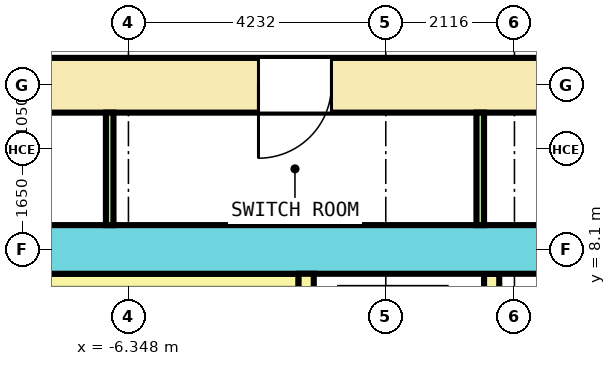
"""IFC4 building model, lengths in metres.
Left out: names, types, materials, properties, quantities, classifications, styles, units other than length and angle.
Written with IfcOpenShell. Run it as: python <this file> out.ifc"""

import sys

from ifc_helpers import new_model, si_unit, direction, frame, frame_2d, origin, place, context, subcontext, project, spatial, rectangle, extrude, element, fill, save


model = new_model("IFC4")
c1 = context("Model", 3, precision=1e-05, world=origin(), true_north=direction((0.0, 1.0)))
c2 = subcontext(c1, "Body", "Model", "MODEL_VIEW")
j1 = project(units=[si_unit("LENGTHUNIT", "METRE"), si_unit("PLANEANGLEUNIT", "RADIAN")], contexts=[c1])
p1 = place(None, origin())
s1 = spatial("IfcSite", under=j1, at=p1, CompositionType="ELEMENT")
p2 = place(p1, origin())
s2 = spatial("IfcBuilding", under=s1, at=p2, CompositionType="ELEMENT")
p3 = place(p2, frame((0.0, 0.0, -5.2)))
s3 = spatial("IfcBuildingStorey", under=s2, at=p3, CompositionType="ELEMENT", Elevation=-5.2)
p4 = place(p3, frame((-13.65, 10.8, 0.0), z_axis=(0.0, 0.0, 1.0), x_axis=(1.0, 0.0, 0.0)))
e1 = element("IfcWall", 1, at=p4, inside=s3, PredefinedType="SHEAR", context=c2, shape_type="SweptSolid", body=[
    extrude(rectangle(XDim=27.3, YDim=0.9, at=frame_2d((13.65, 0.0))), origin(), (0.0, 0.0, 1.0), 4.9),
])
p5 = place(p4, frame((3.316, 0.0, 0.0)))
e2 = element("IfcOpeningElement", 2, at=p5, cuts=e1, PredefinedType="OPENING", context=c2, shape_type="SweptSolid", body=[
    extrude(rectangle(XDim=1.2, YDim=2.1, at=frame_2d((0.6, 1.05))), frame((0.0, 0.46, 0.0), z_axis=(0.0, -1.0, 0.0), x_axis=(1.0, 0.0, 0.0)), (0.0, 0.0, 1.0), 0.92),
])
p6 = place(p4, frame((9.441, 0.0, 0.0)))
e3 = element("IfcOpeningElement", 3, at=p6, cuts=e1, PredefinedType="OPENING", context=c2, shape_type="SweptSolid", body=[
    extrude(rectangle(XDim=1.2, YDim=2.1, at=frame_2d((0.6, 1.05))), frame((0.0, 0.46, 0.0), z_axis=(0.0, -1.0, 0.0), x_axis=(1.0, 0.0, 0.0)), (0.0, 0.0, 1.0), 0.92),
])
p7 = place(p4, frame((18.76, 0.0, 0.0)))
e4 = element("IfcOpeningElement", 4, at=p7, cuts=e1, PredefinedType="OPENING", context=c2, shape_type="SweptSolid", body=[
    extrude(rectangle(XDim=1.2, YDim=2.1, at=frame_2d((0.6, 1.05))), frame((0.0, 0.46, 0.0), z_axis=(0.0, -1.0, 0.0), x_axis=(1.0, 0.0, 0.0)), (0.0, 0.0, 1.0), 0.92),
])
p8 = place(p4, frame((23.484, 0.0, 0.0)))
e5 = element("IfcOpeningElement", 5, at=p8, cuts=e1, PredefinedType="OPENING", context=c2, shape_type="SweptSolid", body=[
    extrude(rectangle(XDim=1.2, YDim=2.1, at=frame_2d((0.6, 1.05))), frame((0.0, 0.46, 0.0), z_axis=(0.0, -1.0, 0.0), x_axis=(1.0, 0.0, 0.0)), (0.0, 0.0, 1.0), 0.92),
])
p9 = place(p4, frame((14.575, 0.0, 0.0)))
e6 = element("IfcOpeningElement", 6, at=p9, cuts=e1, PredefinedType="OPENING", context=c2, shape_type="SweptSolid", body=[
    extrude(rectangle(XDim=1.4, YDim=2.1, at=frame_2d((0.7, 1.05))), frame((0.0, 0.46, 0.0), z_axis=(0.0, -1.0, 0.0), x_axis=(1.0, 0.0, 0.0)), (0.0, 0.0, 1.0), 0.92),
])
p10 = place(p3, frame((-12.75, 8.1, 0.0), z_axis=(0.0, 0.0, 1.0), x_axis=(1.0, 0.0, 0.0)))
e7 = element("IfcWall", 7, at=p10, inside=s3, PredefinedType="SHEAR", context=c2, shape_type="SweptSolid", body=[
    extrude(rectangle(XDim=25.5, YDim=0.8, at=frame_2d((12.75, 0.0))), origin(), (0.0, 0.0, 1.0), 4.9),
])
p11 = place(p10, frame((13.675, 0.0, 0.0)))
e8 = element("IfcOpeningElement", 8, at=p11, cuts=e7, PredefinedType="OPENING", context=c2, shape_type="SweptSolid", body=[
    extrude(rectangle(XDim=1.4, YDim=2.1, at=frame_2d((0.7, 1.05))), frame((0.0, 0.41, 0.0), z_axis=(0.0, -1.0, 0.0), x_axis=(1.0, 0.0, 0.0)), (0.0, 0.0, 1.0), 0.82),
])
p12 = place(p3, frame((-9.35, 7.575, 0.0), z_axis=(0.0, 0.0, 1.0), x_axis=(1.0, 0.0, 0.0)))
e9 = element("IfcWall", 9, at=p12, inside=s3, PredefinedType="SOLIDWALL", context=c2, shape_type="SweptSolid", body=[
    extrude(rectangle(XDim=5.8, YDim=0.25, at=frame_2d((2.9, 0.0))), origin(), (0.0, 0.0, 1.0), 4.9),
])
p13 = place(p3, frame((-3.425, 4.9, 0.0), z_axis=(0.0, 0.0, 1.0), x_axis=(0.0, 1.0, 0.0)))
e10 = element("IfcWall", 10, at=p13, inside=s3, PredefinedType="SOLIDWALL", context=c2, shape_type="SweptSolid", body=[
    extrude(rectangle(XDim=2.8, YDim=0.25, at=frame_2d((1.4, 0.0))), origin(), (0.0, 0.0, 1.0), 4.9),
])
p14 = place(p3, frame((-0.375, 4.9, 0.0), z_axis=(0.0, 0.0, 1.0), x_axis=(0.0, 1.0, 0.0)))
e11 = element("IfcWall", 11, at=p14, inside=s3, PredefinedType="SOLIDWALL", context=c2, shape_type="SweptSolid", body=[
    extrude(rectangle(XDim=2.8, YDim=0.25, at=frame_2d((1.4, 0.0))), origin(), (0.0, 0.0, 1.0), 4.9),
])
p15 = place(p14, frame((0.7, 0.0, 0.0)))
e12 = element("IfcOpeningElement", 12, at=p15, cuts=e11, PredefinedType="OPENING", context=c2, shape_type="SweptSolid", body=[
    extrude(rectangle(XDim=1.4, YDim=2.1, at=frame_2d((0.7, 1.05))), frame((0.0, 0.135, 0.0), z_axis=(0.0, -1.0, 0.0), x_axis=(1.0, 0.0, 0.0)), (0.0, 0.0, 1.0), 0.27),
])
for number, where, z_axis, x_axis in (
    (13, (-6.656, 8.5, 0.0), (0.0, 0.0, 1.0), (0.0, 1.0, 0.0)),
    (14, (-0.562, 8.5, 0.0), (0.0, 0.0, 1.0), (0.0, 1.0, 0.0)),
):
    element("IfcWall", number, at=place(p3, frame(where, z_axis=z_axis, x_axis=x_axis)), inside=s3, PredefinedType="PARTITIONING", context=c2, shape_type="SweptSolid", body=[
        extrude(rectangle(XDim=1.85, YDim=0.125, at=frame_2d((0.925, 0.0))), origin(), (0.0, 0.0, 1.0), 4.9),
    ])
p16 = place(p6, origin())
e15 = element("IfcDoor", 15, at=p16, inside=s3, OperationType="SINGLE_SWING_LEFT", PredefinedType="DOOR", context=c2, shape_type="SweptSolid", body=[
    extrude(rectangle(XDim=1.2, YDim=2.1, at=frame_2d((0.6, 1.05))), frame((0.0, 0.3, 0.0), z_axis=(0.0, -1.0, 0.0), x_axis=(1.0, 0.0, 0.0)), (0.0, 0.0, 1.0), 0.6),
])
fill(e3, e15)
save(model, sys.argv[1])
